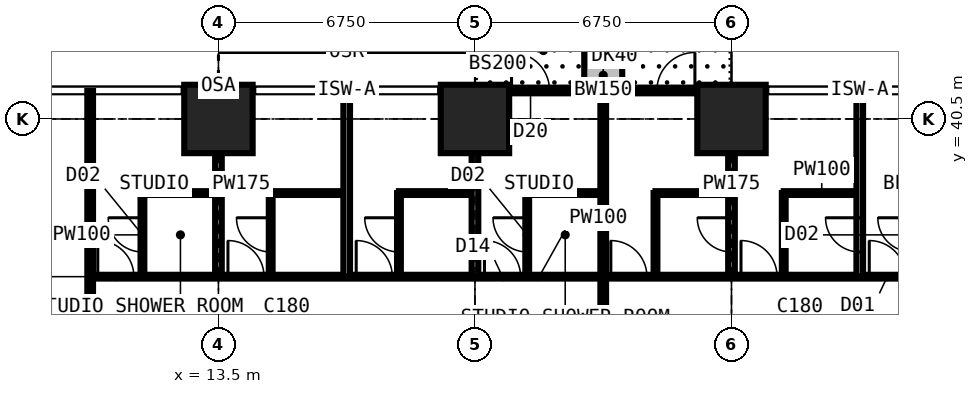
"""IFC4 building model, lengths in metres.
Left out: names, types, materials, properties, quantities, classifications, styles, units other than length and angle.
Written with IfcOpenShell. Run it as: python <this file> out.ifc"""

import sys

from ifc_helpers import new_model, si_unit, direction, frame, frame_2d, origin, origin_2d, place, context, subcontext, project, spatial, rectangle, extrude, element, fill, save


model = new_model("IFC4")
c1 = context("Model", 3, precision=1e-05, world=origin(), true_north=direction((0.0, 1.0)))
c2 = subcontext(c1, "Body", "Model", "MODEL_VIEW")
j1 = project(units=[si_unit("LENGTHUNIT", "METRE"), si_unit("PLANEANGLEUNIT", "RADIAN")], contexts=[c1])
p1 = place(None, origin())
s1 = spatial("IfcSite", under=j1, at=p1, CompositionType="ELEMENT")
p2 = place(p1, origin())
s2 = spatial("IfcBuilding", under=s1, at=p2, CompositionType="ELEMENT")
p3 = place(p2, frame((0.0, 0.0, 57.6)))
s3 = spatial("IfcBuildingStorey", under=s2, at=p3, CompositionType="ELEMENT", Elevation=57.6)
for number, where, z_axis, x_axis in (
    (1, (13.5, 40.5, 0.0), (0.0, 0.0, 1.0), (1.0, 0.0, 0.0)),
    (2, (20.25, 40.5, 0.0), (0.0, 0.0, 1.0), (1.0, 0.0, 0.0)),
    (3, (27.0, 40.5, 0.0), (0.0, 0.0, 1.0), (1.0, 0.0, 0.0)),
):
    element("IfcColumn", number, at=place(p3, frame(where, z_axis=z_axis, x_axis=x_axis)), inside=s3, PredefinedType="COLUMN", context=c2, shape_type="SweptSolid", body=[
        extrude(rectangle(XDim=1.8, YDim=1.8, at=origin_2d()), origin(), (0.0, 0.0, 1.0), 3.6),
    ])
p4 = place(p3, frame((20.25, 41.25, 0.0), z_axis=(0.0, 0.0, 1.0), x_axis=(1.0, 0.0, 0.0)))
e4 = element("IfcWall", 4, at=p4, inside=s3, PredefinedType="SOLIDWALL", context=c2, shape_type="SweptSolid", body=[
    extrude(rectangle(XDim=6.75, YDim=0.15, at=frame_2d((3.375, 0.0))), origin(), (0.0, 0.0, 1.0), 3.375),
])
p5 = place(p4, frame((0.962, 0.0, 0.0)))
e5 = element("IfcOpeningElement", 5, at=p5, cuts=e4, PredefinedType="OPENING", context=c2, shape_type="SweptSolid", body=[
    extrude(rectangle(XDim=1.0, YDim=2.2, at=frame_2d((0.5, 1.1))), frame((0.0, 0.085, 0.0), z_axis=(0.0, -1.0, 0.0), x_axis=(1.0, 0.0, 0.0)), (0.0, 0.0, 1.0), 0.17),
])
p6 = place(p4, frame((2.025, 0.0, 0.9)))
e6 = element("IfcOpeningElement", 6, at=p6, cuts=e4, PredefinedType="OPENING", context=c2, shape_type="SweptSolid", body=[
    extrude(rectangle(XDim=1.2, YDim=1.8, at=frame_2d((0.6, 0.9))), frame((0.0, 0.085, 0.0), z_axis=(0.0, -1.0, 0.0), x_axis=(1.0, 0.0, 0.0)), (0.0, 0.0, 1.0), 0.17),
])
p7 = place(p4, frame((4.788, 0.0, 0.0)))
e7 = element("IfcOpeningElement", 7, at=p7, cuts=e4, PredefinedType="OPENING", context=c2, shape_type="SweptSolid", body=[
    extrude(rectangle(XDim=1.0, YDim=2.2, at=frame_2d((0.5, 1.1))), frame((0.0, 0.085, 0.0), z_axis=(0.0, -1.0, 0.0), x_axis=(1.0, 0.0, 0.0)), (0.0, 0.0, 1.0), 0.17),
])
p8 = place(p4, frame((3.525, 0.0, 0.9)))
e8 = element("IfcOpeningElement", 8, at=p8, cuts=e4, PredefinedType="OPENING", context=c2, shape_type="SweptSolid", body=[
    extrude(rectangle(XDim=1.2, YDim=1.8, at=frame_2d((0.6, 0.9))), frame((0.0, 0.085, 0.0), z_axis=(0.0, -1.0, 0.0), x_axis=(1.0, 0.0, 0.0)), (0.0, 0.0, 1.0), 0.17),
])
p9 = place(p3, frame((23.625, 41.35, 0.0), z_axis=(0.0, 0.0, 1.0), x_axis=(0.0, 1.0, 0.0)))
e9 = element("IfcWall", 9, at=p9, inside=s3, PredefinedType="USERDEFINED", context=c2, shape_type="SweptSolid", body=[
    extrude(rectangle(XDim=2.2, YDim=1.0, at=frame_2d((1.1, 0.0))), origin(), (0.0, 0.0, 1.0), 0.9),
])
p10 = place(p3, frame((10.125, 30.375, 0.0), z_axis=(0.0, 0.0, 1.0), x_axis=(0.0, 1.0, 0.0)))
e10 = element("IfcWall", 10, at=p10, inside=s3, PredefinedType="PARTITIONING", context=c2, shape_type="SweptSolid", body=[
    extrude(rectangle(XDim=10.859, YDim=0.15, at=frame_2d((5.429, 0.0))), origin(), (0.0, 0.0, 1.0), 3.375),
])
p11 = place(p3, frame((10.125, 36.35, 0.0), z_axis=(0.0, 0.0, 1.0), x_axis=(1.0, 0.0, 0.0)))
e11 = element("IfcWall", 11, at=p11, inside=s3, PredefinedType="PARTITIONING", context=c2, shape_type="SweptSolid", body=[
    extrude(rectangle(XDim=23.625, YDim=0.1, at=frame_2d((11.812, 0.0))), origin(), (0.0, 0.0, 1.0), 3.375),
])
p12 = place(p11, frame((20.5, 0.0, 0.0)))
e12 = element("IfcOpeningElement", 12, at=p12, cuts=e11, PredefinedType="OPENING", context=c2, shape_type="SweptSolid", body=[
    extrude(rectangle(XDim=0.95, YDim=2.2, at=frame_2d((0.475, 1.1))), frame((0.0, 0.06, 0.0), z_axis=(0.0, -1.0, 0.0), x_axis=(1.0, 0.0, 0.0)), (0.0, 0.0, 1.0), 0.12),
])
p13 = place(p11, frame((17.125, 0.0, 0.0)))
e13 = element("IfcOpeningElement", 13, at=p13, cuts=e11, PredefinedType="OPENING", context=c2, shape_type="SweptSolid", body=[
    extrude(rectangle(XDim=0.95, YDim=2.2, at=frame_2d((0.475, 1.1))), frame((0.0, 0.06, 0.0), z_axis=(0.0, -1.0, 0.0), x_axis=(1.0, 0.0, 0.0)), (0.0, 0.0, 1.0), 0.12),
])
p14 = place(p11, frame((13.7, 0.0, 0.0)))
e14 = element("IfcOpeningElement", 14, at=p14, cuts=e11, PredefinedType="OPENING", context=c2, shape_type="SweptSolid", body=[
    extrude(rectangle(XDim=0.95, YDim=2.2, at=frame_2d((0.475, 1.1))), frame((0.0, 0.06, 0.0), z_axis=(0.0, -1.0, 0.0), x_axis=(1.0, 0.0, 0.0)), (0.0, 0.0, 1.0), 0.12),
])
p15 = place(p11, frame((0.2, 0.0, 0.0)))
e15 = element("IfcOpeningElement", 15, at=p15, cuts=e11, PredefinedType="OPENING", context=c2, shape_type="SweptSolid", body=[
    extrude(rectangle(XDim=0.95, YDim=2.2, at=frame_2d((0.475, 1.1))), frame((0.0, 0.06, 0.0), z_axis=(0.0, -1.0, 0.0), x_axis=(1.0, 0.0, 0.0)), (0.0, 0.0, 1.0), 0.12),
])
p16 = place(p11, frame((3.625, 0.0, 0.0)))
e16 = element("IfcOpeningElement", 16, at=p16, cuts=e11, PredefinedType="OPENING", context=c2, shape_type="SweptSolid", body=[
    extrude(rectangle(XDim=0.95, YDim=2.2, at=frame_2d((0.475, 1.1))), frame((0.0, 0.06, 0.0), z_axis=(0.0, -1.0, 0.0), x_axis=(1.0, 0.0, 0.0)), (0.0, 0.0, 1.0), 0.12),
])
p17 = place(p11, frame((7.0, 0.0, 0.0)))
e17 = element("IfcOpeningElement", 17, at=p17, cuts=e11, PredefinedType="OPENING", context=c2, shape_type="SweptSolid", body=[
    extrude(rectangle(XDim=0.95, YDim=2.2, at=frame_2d((0.475, 1.1))), frame((0.0, 0.06, 0.0), z_axis=(0.0, -1.0, 0.0), x_axis=(1.0, 0.0, 0.0)), (0.0, 0.0, 1.0), 0.12),
])
p18 = place(p11, frame((10.375, 0.0, 0.0)))
e18 = element("IfcOpeningElement", 18, at=p18, cuts=e11, PredefinedType="OPENING", context=c2, shape_type="SweptSolid", body=[
    extrude(rectangle(XDim=0.95, YDim=2.2, at=frame_2d((0.475, 1.1))), frame((0.0, 0.06, 0.0), z_axis=(0.0, -1.0, 0.0), x_axis=(1.0, 0.0, 0.0)), (0.0, 0.0, 1.0), 0.12),
])
p19 = place(p3, frame((11.5, 36.35, 0.0), z_axis=(0.0, 0.0, 1.0), x_axis=(0.0, 1.0, 0.0)))
e19 = element("IfcWall", 19, at=p19, inside=s3, PredefinedType="PARTITIONING", context=c2, shape_type="SweptSolid", body=[
    extrude(rectangle(XDim=2.2, YDim=0.1, at=frame_2d((1.1, 0.0))), origin(), (0.0, 0.0, 1.0), 3.375),
])
p20 = place(p19, frame((0.65, 0.0, 0.0)))
e20 = element("IfcOpeningElement", 20, at=p20, cuts=e19, PredefinedType="OPENING", context=c2, shape_type="SweptSolid", body=[
    extrude(rectangle(XDim=0.9, YDim=2.2, at=frame_2d((0.45, 1.1))), frame((0.0, 0.06, 0.0), z_axis=(0.0, -1.0, 0.0), x_axis=(1.0, 0.0, 0.0)), (0.0, 0.0, 1.0), 0.12),
])
p21 = place(p3, frame((11.5, 38.55, 0.0), z_axis=(0.0, 0.0, 1.0), x_axis=(1.0, 0.0, 0.0)))
e21 = element("IfcWall", 21, at=p21, inside=s3, PredefinedType="PARTITIONING", context=c2, shape_type="SweptSolid", body=[
    extrude(rectangle(XDim=2.0, YDim=0.1, at=frame_2d((1.0, 0.0))), origin(), (0.0, 0.0, 1.0), 3.375),
])
p22 = place(p3, frame((13.5, 36.35, 0.0), z_axis=(0.0, 0.0, 1.0), x_axis=(0.0, 1.0, 0.0)))
e22 = element("IfcWall", 22, at=p22, inside=s3, PredefinedType="PARTITIONING", context=c2, shape_type="SweptSolid", body=[
    extrude(rectangle(XDim=4.884, YDim=0.175, at=frame_2d((2.442, 0.0))), origin(), (0.0, 0.0, 1.0), 2.61),
])
p23 = place(p3, frame((14.875, 36.35, 0.0), z_axis=(0.0, 0.0, 1.0), x_axis=(0.0, 1.0, 0.0)))
e23 = element("IfcWall", 23, at=p23, inside=s3, PredefinedType="PARTITIONING", context=c2, shape_type="SweptSolid", body=[
    extrude(rectangle(XDim=2.2, YDim=0.1, at=frame_2d((1.1, 0.0))), origin(), (0.0, 0.0, 1.0), 3.375),
])
p24 = place(p23, frame((0.65, 0.0, 0.0)))
e24 = element("IfcOpeningElement", 24, at=p24, cuts=e23, PredefinedType="OPENING", context=c2, shape_type="SweptSolid", body=[
    extrude(rectangle(XDim=0.9, YDim=2.2, at=frame_2d((0.45, 1.1))), frame((0.0, 0.06, 0.0), z_axis=(0.0, -1.0, 0.0), x_axis=(1.0, 0.0, 0.0)), (0.0, 0.0, 1.0), 0.12),
])
p25 = place(p3, frame((14.875, 38.55, 0.0), z_axis=(0.0, 0.0, 1.0), x_axis=(1.0, 0.0, 0.0)))
e25 = element("IfcWall", 25, at=p25, inside=s3, PredefinedType="PARTITIONING", context=c2, shape_type="SweptSolid", body=[
    extrude(rectangle(XDim=2.0, YDim=0.1, at=frame_2d((1.0, 0.0))), origin(), (0.0, 0.0, 1.0), 3.375),
])
p26 = place(p3, frame((16.875, 36.35, 0.0), z_axis=(0.0, 0.0, 1.0), x_axis=(0.0, 1.0, 0.0)))
e26 = element("IfcWall", 26, at=p26, inside=s3, PredefinedType="PARTITIONING", context=c2, shape_type="SweptSolid", body=[
    extrude(rectangle(XDim=4.884, YDim=0.175, at=frame_2d((2.442, 0.0))), origin(), (0.0, 0.0, 1.0), 3.375),
])
p27 = place(p3, frame((18.25, 36.35, 0.0), z_axis=(0.0, 0.0, 1.0), x_axis=(0.0, 1.0, 0.0)))
e27 = element("IfcWall", 27, at=p27, inside=s3, PredefinedType="PARTITIONING", context=c2, shape_type="SweptSolid", body=[
    extrude(rectangle(XDim=2.2, YDim=0.1, at=frame_2d((1.1, 0.0))), origin(), (0.0, 0.0, 1.0), 3.375),
])
p28 = place(p27, frame((0.65, 0.0, 0.0)))
e28 = element("IfcOpeningElement", 28, at=p28, cuts=e27, PredefinedType="OPENING", context=c2, shape_type="SweptSolid", body=[
    extrude(rectangle(XDim=0.9, YDim=2.2, at=frame_2d((0.45, 1.1))), frame((0.0, 0.06, 0.0), z_axis=(0.0, -1.0, 0.0), x_axis=(1.0, 0.0, 0.0)), (0.0, 0.0, 1.0), 0.12),
])
p29 = place(p3, frame((18.25, 38.55, 0.0), z_axis=(0.0, 0.0, 1.0), x_axis=(1.0, 0.0, 0.0)))
e29 = element("IfcWall", 29, at=p29, inside=s3, PredefinedType="PARTITIONING", context=c2, shape_type="SweptSolid", body=[
    extrude(rectangle(XDim=2.0, YDim=0.1, at=frame_2d((1.0, 0.0))), origin(), (0.0, 0.0, 1.0), 3.375),
])
p30 = place(p3, frame((20.25, 36.35, 0.0), z_axis=(0.0, 0.0, 1.0), x_axis=(0.0, 1.0, 0.0)))
e30 = element("IfcWall", 30, at=p30, inside=s3, PredefinedType="PARTITIONING", context=c2, shape_type="SweptSolid", body=[
    extrude(rectangle(XDim=4.884, YDim=0.175, at=frame_2d((2.442, 0.0))), origin(), (0.0, 0.0, 1.0), 2.61),
])
p31 = place(p3, frame((21.625, 36.35, 0.0), z_axis=(0.0, 0.0, 1.0), x_axis=(0.0, 1.0, 0.0)))
e31 = element("IfcWall", 31, at=p31, inside=s3, PredefinedType="PARTITIONING", context=c2, shape_type="SweptSolid", body=[
    extrude(rectangle(XDim=2.2, YDim=0.1, at=frame_2d((1.1, 0.0))), origin(), (0.0, 0.0, 1.0), 3.375),
])
p32 = place(p31, frame((0.65, 0.0, 0.0)))
e32 = element("IfcOpeningElement", 32, at=p32, cuts=e31, PredefinedType="OPENING", context=c2, shape_type="SweptSolid", body=[
    extrude(rectangle(XDim=0.9, YDim=2.2, at=frame_2d((0.45, 1.1))), frame((0.0, 0.06, 0.0), z_axis=(0.0, -1.0, 0.0), x_axis=(1.0, 0.0, 0.0)), (0.0, 0.0, 1.0), 0.12),
])
p33 = place(p3, frame((21.625, 38.55, 0.0), z_axis=(0.0, 0.0, 1.0), x_axis=(1.0, 0.0, 0.0)))
e33 = element("IfcWall", 33, at=p33, inside=s3, PredefinedType="PARTITIONING", context=c2, shape_type="SweptSolid", body=[
    extrude(rectangle(XDim=2.0, YDim=0.1, at=frame_2d((1.0, 0.0))), origin(), (0.0, 0.0, 1.0), 3.375),
])
p34 = place(p3, frame((23.625, 29.2, 0.0), z_axis=(0.0, 0.0, 1.0), x_axis=(0.0, 1.0, 0.0)))
e34 = element("IfcWall", 34, at=p34, inside=s3, PredefinedType="PARTITIONING", context=c2, shape_type="SweptSolid", body=[
    extrude(rectangle(XDim=12.034, YDim=0.15, at=frame_2d((6.017, 0.0))), origin(), (0.0, 0.0, 1.0), 3.375),
])
p35 = place(p3, frame((25.0, 36.35, 0.0), z_axis=(0.0, 0.0, 1.0), x_axis=(0.0, 1.0, 0.0)))
e35 = element("IfcWall", 35, at=p35, inside=s3, PredefinedType="PARTITIONING", context=c2, shape_type="SweptSolid", body=[
    extrude(rectangle(XDim=2.2, YDim=0.1, at=frame_2d((1.1, 0.0))), origin(), (0.0, 0.0, 1.0), 3.375),
])
p36 = place(p3, frame((25.0, 38.55, 0.0), z_axis=(0.0, 0.0, 1.0), x_axis=(1.0, 0.0, 0.0)))
e36 = element("IfcWall", 36, at=p36, inside=s3, PredefinedType="PARTITIONING", context=c2, shape_type="SweptSolid", body=[
    extrude(rectangle(XDim=2.0, YDim=0.1, at=frame_2d((1.0, 0.0))), origin(), (0.0, 0.0, 1.0), 3.375),
])
p37 = place(p3, frame((27.0, 36.35, 0.0), z_axis=(0.0, 0.0, 1.0), x_axis=(0.0, 1.0, 0.0)))
e37 = element("IfcWall", 37, at=p37, inside=s3, PredefinedType="PARTITIONING", context=c2, shape_type="SweptSolid", body=[
    extrude(rectangle(XDim=4.884, YDim=0.175, at=frame_2d((2.442, 0.0))), origin(), (0.0, 0.0, 1.0), 2.877),
])
p38 = place(p37, frame((0.65, 0.0, 0.0)))
e38 = element("IfcOpeningElement", 38, at=p38, cuts=e37, PredefinedType="OPENING", context=c2, shape_type="SweptSolid", body=[
    extrude(rectangle(XDim=0.9, YDim=2.2, at=frame_2d((0.45, 1.1))), frame((0.0, 0.097, 0.0), z_axis=(0.0, -1.0, 0.0), x_axis=(1.0, 0.0, 0.0)), (0.0, 0.0, 1.0), 0.195),
])
p39 = place(p3, frame((28.375, 36.35, 0.0), z_axis=(0.0, 0.0, 1.0), x_axis=(0.0, 1.0, 0.0)))
e39 = element("IfcWall", 39, at=p39, inside=s3, PredefinedType="PARTITIONING", context=c2, shape_type="SweptSolid", body=[
    extrude(rectangle(XDim=2.2, YDim=0.1, at=frame_2d((1.1, 0.0))), origin(), (0.0, 0.0, 1.0), 3.375),
])
p40 = place(p3, frame((28.375, 38.55, 0.0), z_axis=(0.0, 0.0, 1.0), x_axis=(1.0, 0.0, 0.0)))
e40 = element("IfcWall", 40, at=p40, inside=s3, PredefinedType="PARTITIONING", context=c2, shape_type="SweptSolid", body=[
    extrude(rectangle(XDim=2.0, YDim=0.1, at=frame_2d((1.0, 0.0))), origin(), (0.0, 0.0, 1.0), 3.375),
])
p41 = place(p3, frame((30.375, 36.35, 0.0), z_axis=(0.0, 0.0, 1.0), x_axis=(0.0, 1.0, 0.0)))
e41 = element("IfcWall", 41, at=p41, inside=s3, PredefinedType="PARTITIONING", context=c2, shape_type="SweptSolid", body=[
    extrude(rectangle(XDim=4.884, YDim=0.175, at=frame_2d((2.442, 0.0))), origin(), (0.0, 0.0, 1.0), 3.375),
])
p42 = place(p41, frame((0.65, 0.0, 0.0)))
e42 = element("IfcOpeningElement", 42, at=p42, cuts=e41, PredefinedType="OPENING", context=c2, shape_type="SweptSolid", body=[
    extrude(rectangle(XDim=0.9, YDim=2.2, at=frame_2d((0.45, 1.1))), frame((0.0, 0.097, 0.0), z_axis=(0.0, -1.0, 0.0), x_axis=(1.0, 0.0, 0.0)), (0.0, 0.0, 1.0), 0.195),
])
p43 = place(p5, origin())
e43 = element("IfcDoor", 43, at=p43, inside=s3, OperationType="SINGLE_SWING_LEFT", PredefinedType="DOOR", context=c2, shape_type="SweptSolid", body=[
    extrude(rectangle(XDim=1.0, YDim=2.2, at=frame_2d((0.5, 1.1))), frame((0.0, 0.025, 0.0), z_axis=(0.0, -1.0, 0.0), x_axis=(1.0, 0.0, 0.0)), (0.0, 0.0, 1.0), 0.05),
])
fill(e5, e43)
p44 = place(p6, origin())
e44 = element("IfcWindow", 44, at=p44, inside=s3, PartitioningType="SINGLE_PANEL", PredefinedType="WINDOW", context=c2, shape_type="SweptSolid", body=[
    extrude(rectangle(XDim=1.2, YDim=1.8, at=frame_2d((0.6, 0.9))), frame((0.0, 0.03, 0.0), z_axis=(0.0, -1.0, 0.0), x_axis=(1.0, 0.0, 0.0)), (0.0, 0.0, 1.0), 0.06),
])
fill(e6, e44)
p45 = place(p7, origin())
e45 = element("IfcDoor", 45, at=p45, inside=s3, OperationType="SINGLE_SWING_RIGHT", PredefinedType="DOOR", context=c2, shape_type="SweptSolid", body=[
    extrude(rectangle(XDim=1.0, YDim=2.2, at=frame_2d((0.5, 1.1))), frame((0.0, 0.025, 0.0), z_axis=(0.0, -1.0, 0.0), x_axis=(1.0, 0.0, 0.0)), (0.0, 0.0, 1.0), 0.05),
])
fill(e7, e45)
p46 = place(p8, origin())
e46 = element("IfcWindow", 46, at=p46, inside=s3, PartitioningType="SINGLE_PANEL", PredefinedType="WINDOW", context=c2, shape_type="SweptSolid", body=[
    extrude(rectangle(XDim=1.2, YDim=1.8, at=frame_2d((0.6, 0.9))), frame((0.0, 0.03, 0.0), z_axis=(0.0, -1.0, 0.0), x_axis=(1.0, 0.0, 0.0)), (0.0, 0.0, 1.0), 0.06),
])
fill(e8, e46)
p47 = place(p12, origin())
e47 = element("IfcDoor", 47, at=p47, inside=s3, OperationType="SINGLE_SWING_LEFT", PredefinedType="DOOR", context=c2, shape_type="SweptSolid", body=[
    extrude(rectangle(XDim=0.95, YDim=2.2, at=frame_2d((0.475, 1.1))), frame((0.0, 0.025, 0.0), z_axis=(0.0, -1.0, 0.0), x_axis=(1.0, 0.0, 0.0)), (0.0, 0.0, 1.0), 0.05),
])
fill(e12, e47)
p48 = place(p13, origin())
e48 = element("IfcDoor", 48, at=p48, inside=s3, OperationType="SINGLE_SWING_LEFT", PredefinedType="DOOR", context=c2, shape_type="SweptSolid", body=[
    extrude(rectangle(XDim=0.95, YDim=2.2, at=frame_2d((0.475, 1.1))), frame((0.0, 0.025, 0.0), z_axis=(0.0, -1.0, 0.0), x_axis=(1.0, 0.0, 0.0)), (0.0, 0.0, 1.0), 0.05),
])
fill(e13, e48)
p49 = place(p42, origin())
e49 = element("IfcDoor", 49, at=p49, inside=s3, OperationType="SINGLE_SWING_RIGHT", PredefinedType="DOOR", context=c2, shape_type="SweptSolid", body=[
    extrude(rectangle(XDim=0.9, YDim=2.2, at=frame_2d((0.45, 1.1))), frame((0.0, 0.025, 0.0), z_axis=(0.0, -1.0, 0.0), x_axis=(1.0, 0.0, 0.0)), (0.0, 0.0, 1.0), 0.05),
])
fill(e42, e49)
p50 = place(p14, origin())
e50 = element("IfcDoor", 50, at=p50, inside=s3, OperationType="SINGLE_SWING_LEFT", PredefinedType="DOOR", context=c2, shape_type="SweptSolid", body=[
    extrude(rectangle(XDim=0.95, YDim=2.2, at=frame_2d((0.475, 1.1))), frame((0.0, 0.025, 0.0), z_axis=(0.0, -1.0, 0.0), x_axis=(1.0, 0.0, 0.0)), (0.0, 0.0, 1.0), 0.05),
])
fill(e14, e50)
p51 = place(p38, origin())
e51 = element("IfcDoor", 51, at=p51, inside=s3, OperationType="SINGLE_SWING_RIGHT", PredefinedType="DOOR", context=c2, shape_type="SweptSolid", body=[
    extrude(rectangle(XDim=0.9, YDim=2.2, at=frame_2d((0.45, 1.1))), frame((0.0, 0.025, 0.0), z_axis=(0.0, -1.0, 0.0), x_axis=(1.0, 0.0, 0.0)), (0.0, 0.0, 1.0), 0.05),
])
fill(e38, e51)
p52 = place(p15, origin())
e52 = element("IfcDoor", 52, at=p52, inside=s3, OperationType="SINGLE_SWING_LEFT", PredefinedType="DOOR", context=c2, shape_type="SweptSolid", body=[
    extrude(rectangle(XDim=0.95, YDim=2.2, at=frame_2d((0.475, 1.1))), frame((0.0, 0.025, 0.0), z_axis=(0.0, -1.0, 0.0), x_axis=(1.0, 0.0, 0.0)), (0.0, 0.0, 1.0), 0.05),
])
fill(e15, e52)
p53 = place(p20, origin())
e53 = element("IfcDoor", 53, at=p53, inside=s3, OperationType="SINGLE_SWING_RIGHT", PredefinedType="DOOR", context=c2, shape_type="SweptSolid", body=[
    extrude(rectangle(XDim=0.9, YDim=2.2, at=frame_2d((0.45, 1.1))), frame((0.0, 0.025, 0.0), z_axis=(0.0, -1.0, 0.0), x_axis=(1.0, 0.0, 0.0)), (0.0, 0.0, 1.0), 0.05),
])
fill(e20, e53)
p54 = place(p16, origin())
e54 = element("IfcDoor", 54, at=p54, inside=s3, OperationType="SINGLE_SWING_LEFT", PredefinedType="DOOR", context=c2, shape_type="SweptSolid", body=[
    extrude(rectangle(XDim=0.95, YDim=2.2, at=frame_2d((0.475, 1.1))), frame((0.0, 0.025, 0.0), z_axis=(0.0, -1.0, 0.0), x_axis=(1.0, 0.0, 0.0)), (0.0, 0.0, 1.0), 0.05),
])
fill(e16, e54)
p55 = place(p24, origin())
e55 = element("IfcDoor", 55, at=p55, inside=s3, OperationType="SINGLE_SWING_RIGHT", PredefinedType="DOOR", context=c2, shape_type="SweptSolid", body=[
    extrude(rectangle(XDim=0.9, YDim=2.2, at=frame_2d((0.45, 1.1))), frame((0.0, 0.025, 0.0), z_axis=(0.0, -1.0, 0.0), x_axis=(1.0, 0.0, 0.0)), (0.0, 0.0, 1.0), 0.05),
])
fill(e24, e55)
p56 = place(p17, origin())
e56 = element("IfcDoor", 56, at=p56, inside=s3, OperationType="SINGLE_SWING_LEFT", PredefinedType="DOOR", context=c2, shape_type="SweptSolid", body=[
    extrude(rectangle(XDim=0.95, YDim=2.2, at=frame_2d((0.475, 1.1))), frame((0.0, 0.025, 0.0), z_axis=(0.0, -1.0, 0.0), x_axis=(1.0, 0.0, 0.0)), (0.0, 0.0, 1.0), 0.05),
])
fill(e17, e56)
p57 = place(p28, origin())
e57 = element("IfcDoor", 57, at=p57, inside=s3, OperationType="SINGLE_SWING_RIGHT", PredefinedType="DOOR", context=c2, shape_type="SweptSolid", body=[
    extrude(rectangle(XDim=0.9, YDim=2.2, at=frame_2d((0.45, 1.1))), frame((0.0, 0.025, 0.0), z_axis=(0.0, -1.0, 0.0), x_axis=(1.0, 0.0, 0.0)), (0.0, 0.0, 1.0), 0.05),
])
fill(e28, e57)
p58 = place(p18, origin())
e58 = element("IfcDoor", 58, at=p58, inside=s3, OperationType="SINGLE_SWING_LEFT", PredefinedType="DOOR", context=c2, shape_type="SweptSolid", body=[
    extrude(rectangle(XDim=0.95, YDim=2.2, at=frame_2d((0.475, 1.1))), frame((0.0, 0.025, 0.0), z_axis=(0.0, -1.0, 0.0), x_axis=(1.0, 0.0, 0.0)), (0.0, 0.0, 1.0), 0.05),
])
fill(e18, e58)
p59 = place(p32, origin())
e59 = element("IfcDoor", 59, at=p59, inside=s3, OperationType="SINGLE_SWING_RIGHT", PredefinedType="DOOR", context=c2, shape_type="SweptSolid", body=[
    extrude(rectangle(XDim=0.9, YDim=2.2, at=frame_2d((0.45, 1.1))), frame((0.0, 0.025, 0.0), z_axis=(0.0, -1.0, 0.0), x_axis=(1.0, 0.0, 0.0)), (0.0, 0.0, 1.0), 0.05),
])
fill(e32, e59)
save(model, sys.argv[1])
